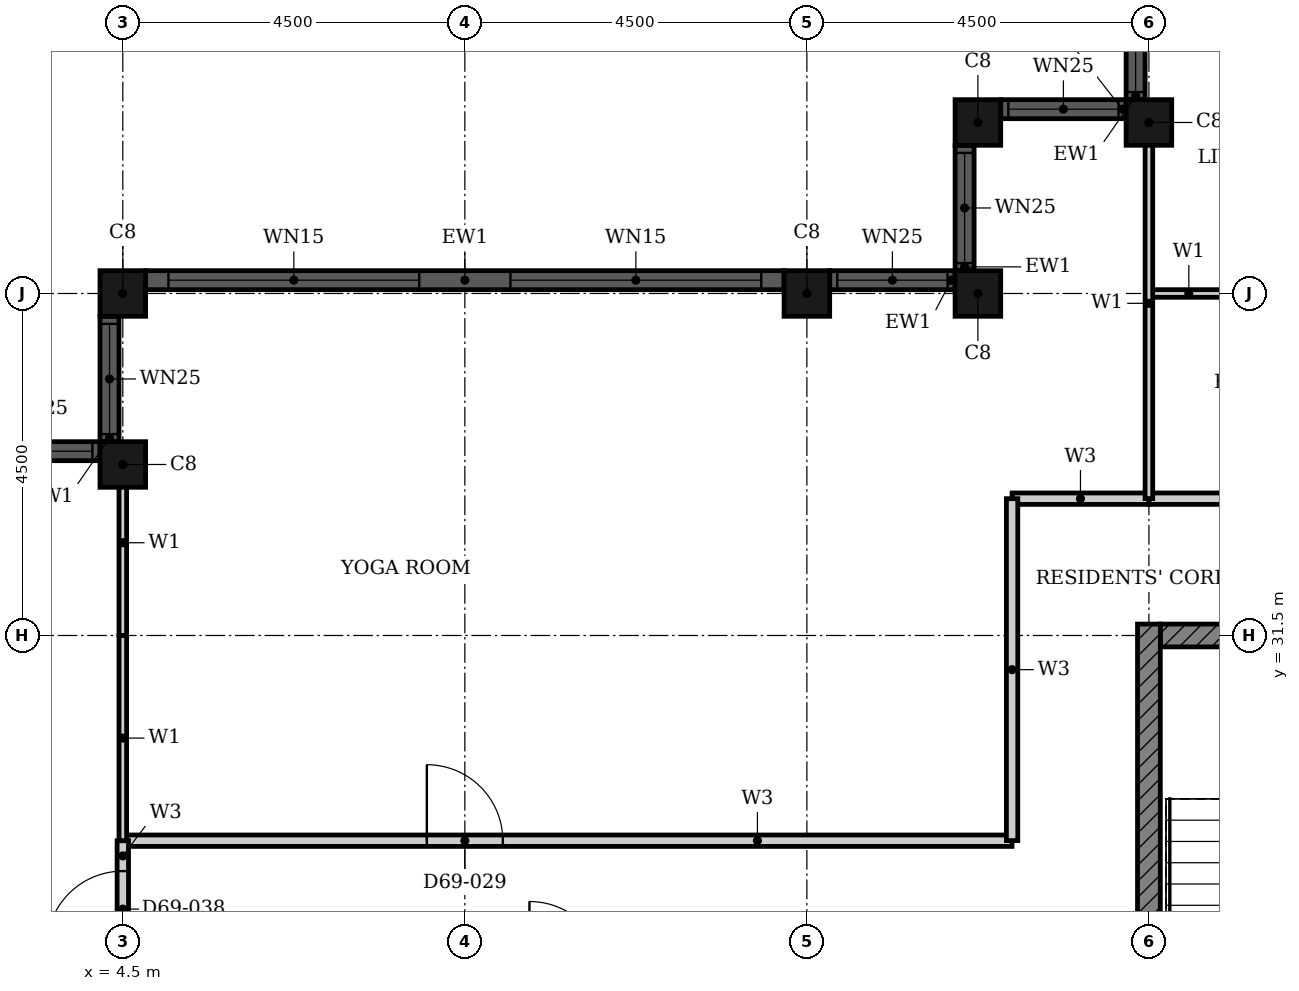
"""IFC4 building model, lengths in metres.
Left out: names, types, materials, properties, quantities, classifications, styles, units other than length and angle.
Written with IfcOpenShell. Run it as: python <this file> out.ifc"""

import sys

from ifc_helpers import new_model, si_unit, direction, frame, frame_2d, origin, origin_2d, place, context, subcontext, project, spatial, rectangle, hollow_rectangle, extrude, element, fill, save


model = new_model("IFC4")
c1 = context("Model", 3, precision=1e-05, world=origin(), true_north=direction((0.0, 1.0)))
c2 = subcontext(c1, "Body", "Model", "MODEL_VIEW")
j1 = project(units=[si_unit("LENGTHUNIT", "METRE"), si_unit("PLANEANGLEUNIT", "RADIAN")], contexts=[c1])
p1 = place(None, origin())
s1 = spatial("IfcSite", under=j1, at=p1, CompositionType="ELEMENT")
p2 = place(p1, origin())
s2 = spatial("IfcBuilding", under=s1, at=p2, CompositionType="ELEMENT")
p3 = place(p2, frame((0.0, 0.0, 271.2)))
s3 = spatial("IfcBuildingStorey", under=s2, at=p3, CompositionType="ELEMENT", Elevation=271.2)
for number, where, z_axis, x_axis in (
    (1, (18.0, 38.25, 0.0), (0.0, 0.0, 1.0), (1.0, 0.0, 0.0)),
    (2, (15.75, 38.25, 0.0), (0.0, 0.0, 1.0), (1.0, 0.0, 0.0)),
    (3, (15.75, 36.0, 0.0), (0.0, 0.0, 1.0), (1.0, 0.0, 0.0)),
    (4, (13.5, 36.0, 0.0), (0.0, 0.0, 1.0), (1.0, 0.0, 0.0)),
    (5, (4.5, 36.0, 0.0), (0.0, 0.0, 1.0), (1.0, 0.0, 0.0)),
    (6, (4.5, 33.75, 0.0), (0.0, 0.0, 1.0), (1.0, 0.0, 0.0)),
):
    element("IfcColumn", number, at=place(p3, frame(where, z_axis=z_axis, x_axis=x_axis)), inside=s3, PredefinedType="COLUMN", context=c2, shape_type="SweptSolid", body=[
        extrude(hollow_rectangle(XDim=0.6, YDim=0.6, WallThickness=0.02, at=origin_2d()), origin(), (0.0, 0.0, 1.0), 3.7),
    ])
p4 = place(p3, frame((17.825, 40.2, 0.0), z_axis=(0.0, 0.0, 1.0), x_axis=(0.0, -1.0, 0.0)))
e7 = element("IfcWall", 7, at=p4, inside=s3, PredefinedType="SOLIDWALL", context=c2, shape_type="SweptSolid", body=[
    extrude(rectangle(XDim=1.65, YDim=0.25, at=frame_2d((0.825, 0.0))), origin(), (0.0, 0.0, 1.0), 3.7),
])
p5 = place(p4, frame((0.1, 0.0, 0.9)))
e8 = element("IfcOpeningElement", 8, at=p5, cuts=e7, PredefinedType="OPENING", context=c2, shape_type="SweptSolid", body=[
    extrude(rectangle(XDim=1.45, YDim=1.85, at=frame_2d((0.725, 0.925))), frame((0.0, 0.135, 0.0), z_axis=(0.0, -1.0, 0.0), x_axis=(1.0, 0.0, 0.0)), (0.0, 0.0, 1.0), 0.27),
])
p6 = place(p3, frame((17.7, 38.425, 0.0), z_axis=(0.0, 0.0, 1.0), x_axis=(-1.0, 0.0, 0.0)))
e9 = element("IfcWall", 9, at=p6, inside=s3, PredefinedType="SOLIDWALL", context=c2, shape_type="SweptSolid", body=[
    extrude(rectangle(XDim=1.65, YDim=0.25, at=frame_2d((0.825, 0.0))), origin(), (0.0, 0.0, 1.0), 3.7),
])
p7 = place(p6, frame((0.1, 0.0, 0.9)))
e10 = element("IfcOpeningElement", 10, at=p7, cuts=e9, PredefinedType="OPENING", context=c2, shape_type="SweptSolid", body=[
    extrude(rectangle(XDim=1.45, YDim=1.85, at=frame_2d((0.725, 0.925))), frame((0.0, 0.135, 0.0), z_axis=(0.0, -1.0, 0.0), x_axis=(1.0, 0.0, 0.0)), (0.0, 0.0, 1.0), 0.27),
])
p8 = place(p3, frame((15.575, 37.95, 0.0), z_axis=(0.0, 0.0, 1.0), x_axis=(0.0, -1.0, 0.0)))
e11 = element("IfcWall", 11, at=p8, inside=s3, PredefinedType="SOLIDWALL", context=c2, shape_type="SweptSolid", body=[
    extrude(rectangle(XDim=1.65, YDim=0.25, at=frame_2d((0.825, 0.0))), origin(), (0.0, 0.0, 1.0), 3.7),
])
p9 = place(p8, frame((0.1, 0.0, 0.9)))
e12 = element("IfcOpeningElement", 12, at=p9, cuts=e11, PredefinedType="OPENING", context=c2, shape_type="SweptSolid", body=[
    extrude(rectangle(XDim=1.45, YDim=1.85, at=frame_2d((0.725, 0.925))), frame((0.0, 0.135, 0.0), z_axis=(0.0, -1.0, 0.0), x_axis=(1.0, 0.0, 0.0)), (0.0, 0.0, 1.0), 0.27),
])
p10 = place(p3, frame((15.45, 36.175, 0.0), z_axis=(0.0, 0.0, 1.0), x_axis=(-1.0, 0.0, 0.0)))
e13 = element("IfcWall", 13, at=p10, inside=s3, PredefinedType="SOLIDWALL", context=c2, shape_type="SweptSolid", body=[
    extrude(rectangle(XDim=1.65, YDim=0.25, at=frame_2d((0.825, 0.0))), origin(), (0.0, 0.0, 1.0), 3.7),
])
p11 = place(p10, frame((0.1, 0.0, 0.9)))
e14 = element("IfcOpeningElement", 14, at=p11, cuts=e13, PredefinedType="OPENING", context=c2, shape_type="SweptSolid", body=[
    extrude(rectangle(XDim=1.45, YDim=1.85, at=frame_2d((0.725, 0.925))), frame((0.0, 0.135, 0.0), z_axis=(0.0, -1.0, 0.0), x_axis=(1.0, 0.0, 0.0)), (0.0, 0.0, 1.0), 0.27),
])
p12 = place(p3, frame((13.2, 36.175, 0.0), z_axis=(0.0, 0.0, 1.0), x_axis=(-1.0, 0.0, 0.0)))
e15 = element("IfcWall", 15, at=p12, inside=s3, PredefinedType="SOLIDWALL", context=c2, shape_type="SweptSolid", body=[
    extrude(rectangle(XDim=8.4, YDim=0.25, at=frame_2d((4.2, 0.0))), origin(), (0.0, 0.0, 1.0), 3.7),
])
p13 = place(p12, frame((0.3, 0.0, 0.45)))
e16 = element("IfcOpeningElement", 16, at=p13, cuts=e15, PredefinedType="OPENING", context=c2, shape_type="SweptSolid", body=[
    extrude(rectangle(XDim=3.3, YDim=2.3, at=frame_2d((1.65, 1.15))), frame((0.0, 0.135, 0.0), z_axis=(0.0, -1.0, 0.0), x_axis=(1.0, 0.0, 0.0)), (0.0, 0.0, 1.0), 0.27),
])
p14 = place(p12, frame((4.8, 0.0, 0.45)))
e17 = element("IfcOpeningElement", 17, at=p14, cuts=e15, PredefinedType="OPENING", context=c2, shape_type="SweptSolid", body=[
    extrude(rectangle(XDim=3.3, YDim=2.3, at=frame_2d((1.65, 1.15))), frame((0.0, 0.135, 0.0), z_axis=(0.0, -1.0, 0.0), x_axis=(1.0, 0.0, 0.0)), (0.0, 0.0, 1.0), 0.27),
])
p15 = place(p3, frame((4.325, 35.7, 0.0), z_axis=(0.0, 0.0, 1.0), x_axis=(0.0, -1.0, 0.0)))
e18 = element("IfcWall", 18, at=p15, inside=s3, PredefinedType="SOLIDWALL", context=c2, shape_type="SweptSolid", body=[
    extrude(rectangle(XDim=1.65, YDim=0.25, at=frame_2d((0.825, 0.0))), origin(), (0.0, 0.0, 1.0), 3.7),
])
p16 = place(p15, frame((0.1, 0.0, 0.9)))
e19 = element("IfcOpeningElement", 19, at=p16, cuts=e18, PredefinedType="OPENING", context=c2, shape_type="SweptSolid", body=[
    extrude(rectangle(XDim=1.45, YDim=1.85, at=frame_2d((0.725, 0.925))), frame((0.0, 0.135, 0.0), z_axis=(0.0, -1.0, 0.0), x_axis=(1.0, 0.0, 0.0)), (0.0, 0.0, 1.0), 0.27),
])
p17 = place(p3, frame((4.2, 33.925, 0.0), z_axis=(0.0, 0.0, 1.0), x_axis=(-1.0, 0.0, 0.0)))
e20 = element("IfcWall", 20, at=p17, inside=s3, PredefinedType="SOLIDWALL", context=c2, shape_type="SweptSolid", body=[
    extrude(rectangle(XDim=1.65, YDim=0.25, at=frame_2d((0.825, 0.0))), origin(), (0.0, 0.0, 1.0), 3.7),
])
p18 = place(p17, frame((0.1, 0.0, 0.9)))
e21 = element("IfcOpeningElement", 21, at=p18, cuts=e20, PredefinedType="OPENING", context=c2, shape_type="SweptSolid", body=[
    extrude(rectangle(XDim=1.45, YDim=1.85, at=frame_2d((0.725, 0.925))), frame((0.0, 0.135, 0.0), z_axis=(0.0, -1.0, 0.0), x_axis=(1.0, 0.0, 0.0)), (0.0, 0.0, 1.0), 0.27),
])
p19 = place(p3, frame((18.15, 31.5, 0.0), z_axis=(0.0, 0.0, 1.0), x_axis=(1.0, 0.0, 0.0)))
e22 = element("IfcWall", 22, at=p19, inside=s3, PredefinedType="SHEAR", context=c2, shape_type="SweptSolid", body=[
    extrude(rectangle(XDim=9.368, YDim=0.3, at=frame_2d((4.684, 0.0))), origin(), (0.0, 0.0, 1.0), 3.4),
])
p20 = place(p19, frame((4.736, 0.0, 0.0)))
e23 = element("IfcOpeningElement", 23, at=p20, cuts=e22, PredefinedType="OPENING", context=c2, shape_type="SweptSolid", body=[
    extrude(rectangle(XDim=1.8, YDim=2.1, at=frame_2d((0.9, 1.05))), frame((0.0, 0.16, 0.0), z_axis=(0.0, -1.0, 0.0), x_axis=(1.0, 0.0, 0.0)), (0.0, 0.0, 1.0), 0.32),
])
p21 = place(p3, frame((18.0, 22.35, 0.0), z_axis=(0.0, 0.0, 1.0), x_axis=(0.0, 1.0, 0.0)))
e24 = element("IfcWall", 24, at=p21, inside=s3, PredefinedType="SHEAR", context=c2, shape_type="SweptSolid", body=[
    extrude(rectangle(XDim=9.3, YDim=0.3, at=frame_2d((4.65, 0.0))), origin(), (0.0, 0.0, 1.0), 3.4),
])
p22 = place(p3, frame((4.5, 28.8, 0.0), z_axis=(0.0, 0.0, 1.0), x_axis=(1.0, 0.0, 0.0)))
e25 = element("IfcWall", 25, at=p22, inside=s3, PredefinedType="PARTITIONING", context=c2, shape_type="SweptSolid", body=[
    extrude(rectangle(XDim=11.699, YDim=0.15, at=frame_2d((5.85, 0.0))), origin(), (0.0, 0.0, 1.0), 3.4),
])
p23 = place(p22, frame((4.0, 0.0, 0.0)))
e26 = element("IfcOpeningElement", 26, at=p23, cuts=e25, PredefinedType="OPENING", context=c2, shape_type="SweptSolid", body=[
    extrude(rectangle(XDim=1.0, YDim=2.1, at=frame_2d((0.5, 1.05))), frame((0.0, 0.085, 0.0), z_axis=(0.0, -1.0, 0.0), x_axis=(1.0, 0.0, 0.0)), (0.0, 0.0, 1.0), 0.17),
])
p24 = place(p3, frame((18.0, 33.3, 0.0), z_axis=(0.0, 0.0, 1.0), x_axis=(1.0, 0.0, 0.0)))
e27 = element("IfcWall", 27, at=p24, inside=s3, PredefinedType="PARTITIONING", context=c2, shape_type="SweptSolid", body=[
    extrude(rectangle(XDim=6.6, YDim=0.15, at=frame_2d((3.3, 0.0))), origin(), (0.0, 0.0, 1.0), 3.4),
])
p25 = place(p24, frame((4.3, 0.0, 0.0)))
e28 = element("IfcOpeningElement", 28, at=p25, cuts=e27, PredefinedType="OPENING", context=c2, shape_type="SweptSolid", body=[
    extrude(rectangle(XDim=1.0, YDim=2.2, at=frame_2d((0.5, 1.1))), frame((0.0, 0.085, 0.0), z_axis=(0.0, -1.0, 0.0), x_axis=(1.0, 0.0, 0.0)), (0.0, 0.0, 1.0), 0.17),
])
p26 = place(p3, frame((16.2, 33.3, 0.0), z_axis=(0.0, 0.0, 1.0), x_axis=(1.0, 0.0, 0.0)))
e29 = element("IfcWall", 29, at=p26, inside=s3, PredefinedType="PARTITIONING", context=c2, shape_type="SweptSolid", body=[
    extrude(rectangle(XDim=1.799, YDim=0.15, at=frame_2d((0.899, 0.0))), origin(), (0.0, 0.0, 1.0), 3.4),
])
p27 = place(p3, frame((16.2, 28.801, 0.0), z_axis=(0.0, 0.0, 1.0), x_axis=(0.0, 1.0, 0.0)))
e30 = element("IfcWall", 30, at=p27, inside=s3, PredefinedType="PARTITIONING", context=c2, shape_type="SweptSolid", body=[
    extrude(rectangle(XDim=4.499, YDim=0.15, at=frame_2d((2.25, 0.0))), origin(), (0.0, 0.0, 1.0), 3.4),
])
p28 = place(p3, frame((4.5, 27.0, 0.0), z_axis=(0.0, 0.0, 1.0), x_axis=(0.0, 1.0, 0.0)))
e31 = element("IfcWall", 31, at=p28, inside=s3, PredefinedType="PARTITIONING", context=c2, shape_type="SweptSolid", body=[
    extrude(rectangle(XDim=1.8, YDim=0.15, at=frame_2d((0.9, 0.0))), origin(), (0.0, 0.0, 1.0), 3.4),
])
p29 = place(p28, frame((0.4, 0.0, 0.0)))
e32 = element("IfcOpeningElement", 32, at=p29, cuts=e31, PredefinedType="OPENING", context=c2, shape_type="SweptSolid", body=[
    extrude(rectangle(XDim=1.0, YDim=2.1, at=frame_2d((0.5, 1.05))), frame((0.0, 0.085, 0.0), z_axis=(0.0, -1.0, 0.0), x_axis=(1.0, 0.0, 0.0)), (0.0, 0.0, 1.0), 0.17),
])
p30 = place(p3, frame((18.0, 36.0, 0.0), z_axis=(0.0, 0.0, 1.0), x_axis=(1.0, 0.0, 0.0)))
e33 = element("IfcWall", 33, at=p30, inside=s3, PredefinedType="PARTITIONING", context=c2, shape_type="SweptSolid", body=[
    extrude(rectangle(XDim=3.0, YDim=0.1, at=frame_2d((1.5, 0.0))), origin(), (0.0, 0.0, 1.0), 3.4),
])
p31 = place(p30, frame((1.05, 0.0, 0.0)))
e34 = element("IfcOpeningElement", 34, at=p31, cuts=e33, PredefinedType="OPENING", context=c2, shape_type="SweptSolid", body=[
    extrude(rectangle(XDim=0.9, YDim=2.1, at=frame_2d((0.45, 1.05))), frame((0.0, 0.06, 0.0), z_axis=(0.0, -1.0, 0.0), x_axis=(1.0, 0.0, 0.0)), (0.0, 0.0, 1.0), 0.12),
])
p32 = place(p3, frame((18.0, 33.301, 0.0), z_axis=(0.0, 0.0, 1.0), x_axis=(0.0, 1.0, 0.0)))
e35 = element("IfcWall", 35, at=p32, inside=s3, PredefinedType="PARTITIONING", context=c2, shape_type="SweptSolid", body=[
    extrude(rectangle(XDim=5.139, YDim=0.1, at=frame_2d((2.569, 0.0))), origin(), (0.0, 0.0, 1.0), 3.4),
])
p33 = place(p3, frame((4.5, 28.8, 0.0), z_axis=(0.0, 0.0, 1.0), x_axis=(0.0, 1.0, 0.0)))
e36 = element("IfcWall", 36, at=p33, inside=s3, PredefinedType="PARTITIONING", context=c2, shape_type="SweptSolid", body=[
    extrude(rectangle(XDim=2.7, YDim=0.1, at=frame_2d((1.35, 0.0))), origin(), (0.0, 0.0, 1.0), 3.4),
])
p34 = place(p3, frame((4.5, 31.501, 0.0), z_axis=(0.0, 0.0, 1.0), x_axis=(0.0, 1.0, 0.0)))
e37 = element("IfcWall", 37, at=p34, inside=s3, PredefinedType="PARTITIONING", context=c2, shape_type="SweptSolid", body=[
    extrude(rectangle(XDim=2.439, YDim=0.1, at=frame_2d((1.219, 0.0))), origin(), (0.0, 0.0, 1.0), 3.4),
])
p35 = place(p5, origin())
e38 = element("IfcWindow", 38, at=p35, inside=s3, PartitioningType="SINGLE_PANEL", PredefinedType="WINDOW", context=c2, shape_type="SweptSolid", body=[
    extrude(rectangle(XDim=1.45, YDim=1.85, at=frame_2d((0.725, 0.925))), frame((0.0, 0.03, 0.0), z_axis=(0.0, -1.0, 0.0), x_axis=(1.0, 0.0, 0.0)), (0.0, 0.0, 1.0), 0.06),
])
fill(e8, e38)
p36 = place(p7, origin())
e39 = element("IfcWindow", 39, at=p36, inside=s3, PartitioningType="SINGLE_PANEL", PredefinedType="WINDOW", context=c2, shape_type="SweptSolid", body=[
    extrude(rectangle(XDim=1.45, YDim=1.85, at=frame_2d((0.725, 0.925))), frame((0.0, 0.03, 0.0), z_axis=(0.0, -1.0, 0.0), x_axis=(1.0, 0.0, 0.0)), (0.0, 0.0, 1.0), 0.06),
])
fill(e10, e39)
p37 = place(p9, origin())
e40 = element("IfcWindow", 40, at=p37, inside=s3, PartitioningType="SINGLE_PANEL", PredefinedType="WINDOW", context=c2, shape_type="SweptSolid", body=[
    extrude(rectangle(XDim=1.45, YDim=1.85, at=frame_2d((0.725, 0.925))), frame((0.0, 0.03, 0.0), z_axis=(0.0, -1.0, 0.0), x_axis=(1.0, 0.0, 0.0)), (0.0, 0.0, 1.0), 0.06),
])
fill(e12, e40)
p38 = place(p11, origin())
e41 = element("IfcWindow", 41, at=p38, inside=s3, PartitioningType="SINGLE_PANEL", PredefinedType="WINDOW", context=c2, shape_type="SweptSolid", body=[
    extrude(rectangle(XDim=1.45, YDim=1.85, at=frame_2d((0.725, 0.925))), frame((0.0, 0.03, 0.0), z_axis=(0.0, -1.0, 0.0), x_axis=(1.0, 0.0, 0.0)), (0.0, 0.0, 1.0), 0.06),
])
fill(e14, e41)
p39 = place(p13, origin())
e42 = element("IfcWindow", 42, at=p39, inside=s3, PartitioningType="SINGLE_PANEL", PredefinedType="WINDOW", context=c2, shape_type="SweptSolid", body=[
    extrude(rectangle(XDim=3.3, YDim=2.3, at=frame_2d((1.65, 1.15))), frame((0.0, 0.03, 0.0), z_axis=(0.0, -1.0, 0.0), x_axis=(1.0, 0.0, 0.0)), (0.0, 0.0, 1.0), 0.06),
])
fill(e16, e42)
p40 = place(p14, origin())
e43 = element("IfcWindow", 43, at=p40, inside=s3, PartitioningType="SINGLE_PANEL", PredefinedType="WINDOW", context=c2, shape_type="SweptSolid", body=[
    extrude(rectangle(XDim=3.3, YDim=2.3, at=frame_2d((1.65, 1.15))), frame((0.0, 0.03, 0.0), z_axis=(0.0, -1.0, 0.0), x_axis=(1.0, 0.0, 0.0)), (0.0, 0.0, 1.0), 0.06),
])
fill(e17, e43)
p41 = place(p16, origin())
e44 = element("IfcWindow", 44, at=p41, inside=s3, PartitioningType="SINGLE_PANEL", PredefinedType="WINDOW", context=c2, shape_type="SweptSolid", body=[
    extrude(rectangle(XDim=1.45, YDim=1.85, at=frame_2d((0.725, 0.925))), frame((0.0, 0.03, 0.0), z_axis=(0.0, -1.0, 0.0), x_axis=(1.0, 0.0, 0.0)), (0.0, 0.0, 1.0), 0.06),
])
fill(e19, e44)
p42 = place(p18, origin())
e45 = element("IfcWindow", 45, at=p42, inside=s3, PartitioningType="SINGLE_PANEL", PredefinedType="WINDOW", context=c2, shape_type="SweptSolid", body=[
    extrude(rectangle(XDim=1.45, YDim=1.85, at=frame_2d((0.725, 0.925))), frame((0.0, 0.03, 0.0), z_axis=(0.0, -1.0, 0.0), x_axis=(1.0, 0.0, 0.0)), (0.0, 0.0, 1.0), 0.06),
])
fill(e21, e45)
p43 = place(p23, origin())
e46 = element("IfcDoor", 46, at=p43, inside=s3, OperationType="SINGLE_SWING_LEFT", PredefinedType="DOOR", context=c2, shape_type="SweptSolid", body=[
    extrude(rectangle(XDim=1.0, YDim=2.1, at=frame_2d((0.5, 1.05))), frame((0.0, 0.025, 0.0), z_axis=(0.0, -1.0, 0.0), x_axis=(1.0, 0.0, 0.0)), (0.0, 0.0, 1.0), 0.05),
])
fill(e26, e46)
p44 = place(p29, origin())
e47 = element("IfcDoor", 47, at=p44, inside=s3, OperationType="SINGLE_SWING_LEFT", PredefinedType="DOOR", context=c2, shape_type="SweptSolid", body=[
    extrude(rectangle(XDim=1.0, YDim=2.1, at=frame_2d((0.5, 1.05))), frame((0.0, 0.025, 0.0), z_axis=(0.0, -1.0, 0.0), x_axis=(1.0, 0.0, 0.0)), (0.0, 0.0, 1.0), 0.05),
])
fill(e32, e47)
save(model, sys.argv[1])
